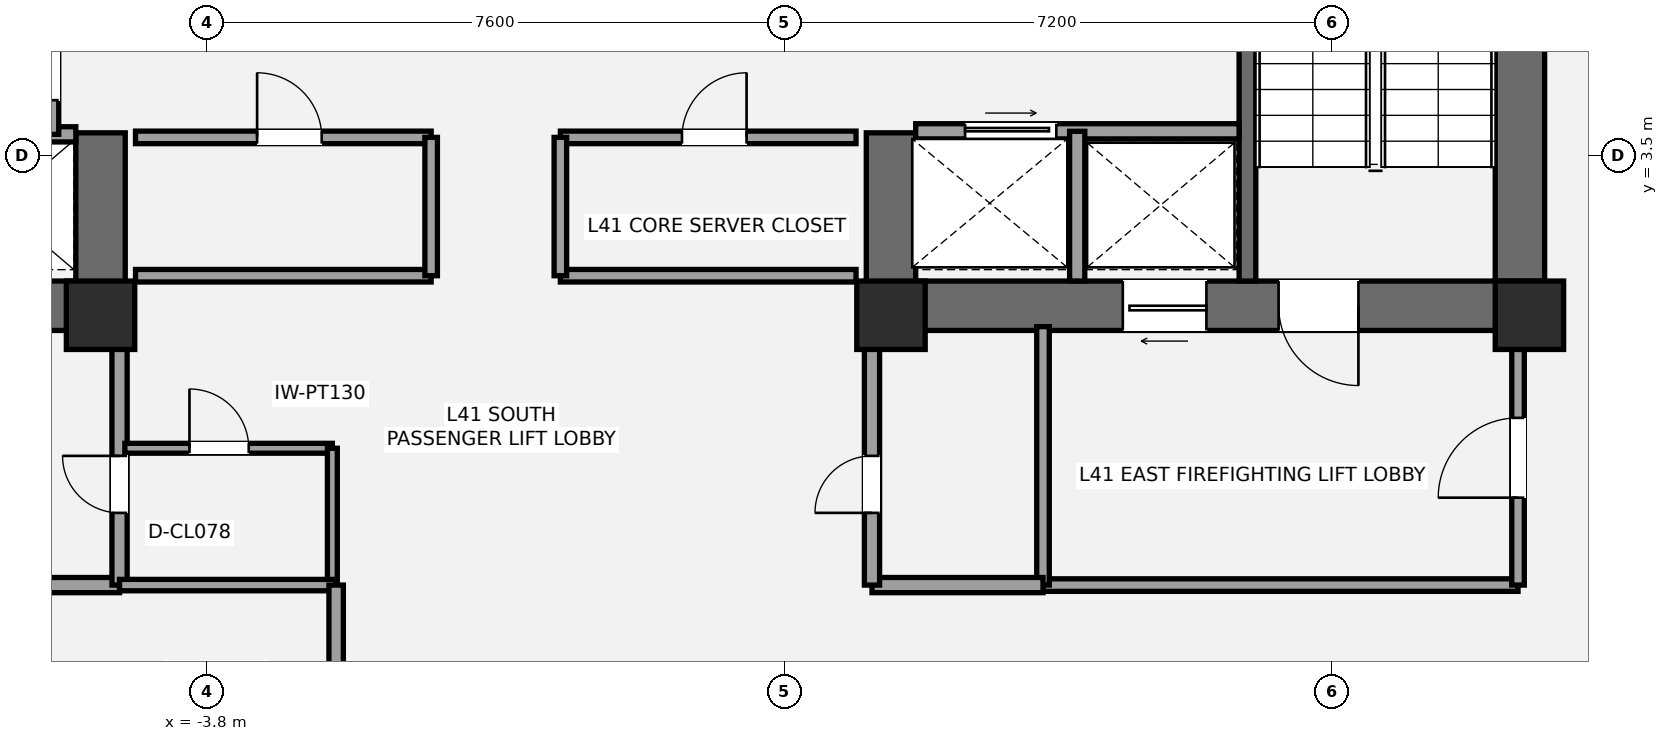
"""IFC4 building model, lengths in metres.
Left out: names, types, materials, properties, quantities, classifications, styles, units other than length and angle.
Written with IfcOpenShell. Run it as: python <this file> out.ifc"""

import sys

from ifc_helpers import new_model, si_unit, direction, frame, frame_2d, origin, origin_2d, place, context, subcontext, project, spatial, rectangle, extrude, element, fill, save


model = new_model("IFC4")
c1 = context("Model", 3, precision=1e-05, world=origin(), true_north=direction((0.0, 1.0)))
c2 = subcontext(c1, "Body", "Model", "MODEL_VIEW")
j1 = project(units=[si_unit("LENGTHUNIT", "METRE"), si_unit("PLANEANGLEUNIT", "RADIAN")], contexts=[c1])
p1 = place(None, origin())
s1 = spatial("IfcSite", under=j1, at=p1, CompositionType="ELEMENT")
p2 = place(p1, origin())
s2 = spatial("IfcBuilding", under=s1, at=p2, CompositionType="ELEMENT")
p3 = place(p2, frame((0.0, 0.0, 153.4)))
s3 = spatial("IfcBuildingStorey", under=s2, at=p3, CompositionType="ELEMENT", Elevation=153.4)
p4 = place(p3, frame((-4.875, 1.525, 0.0), z_axis=(0.0, 0.0, 1.0), x_axis=(-1.0, 0.0, 0.0)))
e1 = element("IfcWall", 1, at=p4, inside=s3, PredefinedType="SHEAR", context=c2, shape_type="SweptSolid", body=[
    extrude(rectangle(XDim=8.925, YDim=0.65, at=frame_2d((4.462, 0.0))), origin(), (0.0, 0.0, 1.0), 3.2),
])
p5 = place(p4, frame((5.425, 0.0, 0.0)))
e2 = element("IfcOpeningElement", 2, at=p5, cuts=e1, PredefinedType="OPENING", context=c2, shape_type="SweptSolid", body=[
    extrude(rectangle(XDim=1.05, YDim=2.15, at=frame_2d((0.525, 1.075))), frame((0.0, 0.335, 0.0), z_axis=(0.0, -1.0, 0.0), x_axis=(1.0, 0.0, 0.0)), (0.0, 0.0, 1.0), 0.67),
])
p6 = place(p4, frame((3.755, 0.0, 0.0)))
e3 = element("IfcOpeningElement", 3, at=p6, cuts=e1, PredefinedType="OPENING", context=c2, shape_type="SweptSolid", body=[
    extrude(rectangle(XDim=1.1, YDim=2.2, at=frame_2d((0.55, 1.1))), frame((0.0, 0.335, 0.0), z_axis=(0.0, -1.0, 0.0), x_axis=(1.0, 0.0, 0.0)), (0.0, 0.0, 1.0), 0.67),
])
p7 = place(p3, frame((-5.2, 1.2, 0.0), z_axis=(0.0, 0.0, 1.0), x_axis=(0.0, 1.0, 0.0)))
e4 = element("IfcWall", 4, at=p7, inside=s3, PredefinedType="SHEAR", context=c2, shape_type="SweptSolid", body=[
    extrude(rectangle(XDim=2.6, YDim=0.65, at=frame_2d((1.3, 0.0))), origin(), (0.0, 0.0, 1.0), 3.2),
])
p8 = place(p3, frame((13.475, 1.2, 0.0), z_axis=(0.0, 0.0, 1.0), x_axis=(0.0, 1.0, 0.0)))
e5 = element("IfcWall", 5, at=p8, inside=s3, PredefinedType="SHEAR", context=c2, shape_type="SweptSolid", body=[
    extrude(rectangle(XDim=8.45, YDim=0.65, at=frame_2d((4.225, 0.0))), origin(), (0.0, 0.0, 1.0), 3.2),
])
p9 = place(p3, frame((13.8, 1.525, 0.0), z_axis=(0.0, 0.0, 1.0), x_axis=(-1.0, 0.0, 0.0)))
e6 = element("IfcWall", 6, at=p9, inside=s3, PredefinedType="SHEAR", context=c2, shape_type="SweptSolid", body=[
    extrude(rectangle(XDim=8.925, YDim=0.65, at=frame_2d((4.462, 0.0))), origin(), (0.0, 0.0, 1.0), 3.2),
])
p10 = place(p9, frame((2.45, 0.0, 0.0)))
e7 = element("IfcOpeningElement", 7, at=p10, cuts=e6, PredefinedType="OPENING", context=c2, shape_type="SweptSolid", body=[
    extrude(rectangle(XDim=1.05, YDim=2.15, at=frame_2d((0.525, 1.075))), frame((0.0, 0.335, 0.0), z_axis=(0.0, -1.0, 0.0), x_axis=(1.0, 0.0, 0.0)), (0.0, 0.0, 1.0), 0.67),
])
p11 = place(p9, frame((4.45, 0.0, 0.0)))
e8 = element("IfcOpeningElement", 8, at=p11, cuts=e6, PredefinedType="OPENING", context=c2, shape_type="SweptSolid", body=[
    extrude(rectangle(XDim=1.1, YDim=2.2, at=frame_2d((0.55, 1.1))), frame((0.0, 0.335, 0.0), z_axis=(0.0, -1.0, 0.0), x_axis=(1.0, 0.0, 0.0)), (0.0, 0.0, 1.0), 0.67),
])
p12 = place(p3, frame((5.2, 1.2, 0.0), z_axis=(0.0, 0.0, 1.0), x_axis=(0.0, 1.0, 0.0)))
e9 = element("IfcWall", 9, at=p12, inside=s3, PredefinedType="SHEAR", context=c2, shape_type="SweptSolid", body=[
    extrude(rectangle(XDim=2.6, YDim=0.65, at=frame_2d((1.3, 0.0))), origin(), (0.0, 0.0, 1.0), 3.2),
])
p13 = place(p3, frame((9.89, 1.85, 0.0), z_axis=(0.0, 0.0, 1.0), x_axis=(0.0, 1.0, 0.0)))
e10 = element("IfcWall", 10, at=p13, inside=s3, PredefinedType="SHEAR", context=c2, shape_type="SweptSolid", body=[
    extrude(rectangle(XDim=7.15, YDim=0.22, at=frame_2d((3.575, 0.0))), origin(), (0.0, 0.0, 1.0), 3.2),
])
for number, where, z_axis, x_axis in (
    (11, (-5.2, 1.4, 0.0), (0.0, 0.0, 1.0), (1.0, 0.0, 0.0)),
    (12, (5.2, 1.4, 0.0), (0.0, 0.0, 1.0), (1.0, 0.0, 0.0)),
    (13, (13.6, 1.4, 0.0), (0.0, 0.0, 1.0), (1.0, 0.0, 0.0)),
):
    element("IfcColumn", number, at=place(p3, frame(where, z_axis=z_axis, x_axis=x_axis)), inside=s3, PredefinedType="COLUMN", context=c2, shape_type="SweptSolid", body=[
        extrude(rectangle(XDim=0.9, YDim=0.9, at=origin_2d()), origin(), (0.0, 0.0, 1.0), 3.2),
    ])
p14 = place(p3, frame((-7.2, -2.15, 0.0), z_axis=(0.0, 0.0, 1.0), x_axis=(1.0, 0.0, 0.0)))
e14 = element("IfcWall", 14, at=p14, inside=s3, PredefinedType="SOLIDWALL", context=c2, shape_type="SweptSolid", body=[
    extrude(rectangle(XDim=2.25, YDim=0.2, at=frame_2d((1.125, 0.0))), origin(), (0.0, 0.0, 1.0), 2.473),
])
p15 = place(p3, frame((-4.95, -2.15, 0.0), z_axis=(0.0, 0.0, 1.0), x_axis=(0.0, 1.0, 0.0)))
e15 = element("IfcWall", 15, at=p15, inside=s3, PredefinedType="SOLIDWALL", context=c2, shape_type="SweptSolid", body=[
    extrude(rectangle(XDim=3.4, YDim=0.2, at=frame_2d((1.7, 0.0))), origin(), (0.0, 0.0, 1.0), 2.473),
])
p16 = place(p15, frame((0.95, 0.0, 0.0)))
e16 = element("IfcOpeningElement", 16, at=p16, cuts=e15, PredefinedType="OPENING", context=c2, shape_type="SweptSolid", body=[
    extrude(rectangle(XDim=0.75, YDim=2.1, at=frame_2d((0.375, 1.05))), frame((0.0, 0.11, 0.0), z_axis=(0.0, -1.0, 0.0), x_axis=(1.0, 0.0, 0.0)), (0.0, 0.0, 1.0), 0.22),
])
p17 = place(p3, frame((7.2, -2.15, 0.0), z_axis=(0.0, 0.0, 1.0), x_axis=(1.0, 0.0, 0.0)))
e17 = element("IfcWall", 17, at=p17, inside=s3, PredefinedType="PARTITIONING", context=c2, shape_type="SweptSolid", body=[
    extrude(rectangle(XDim=6.25, YDim=0.165, at=frame_2d((3.125, 0.0))), origin(), (0.0, 0.0, 1.0), 3.02),
])
p18 = place(p3, frame((7.2, -2.15, 0.0), z_axis=(0.0, 0.0, 1.0), x_axis=(0.0, 1.0, 0.0)))
e18 = element("IfcWall", 18, at=p18, inside=s3, PredefinedType="PARTITIONING", context=c2, shape_type="SweptSolid", body=[
    extrude(rectangle(XDim=3.4, YDim=0.165, at=frame_2d((1.7, 0.0))), origin(), (0.0, 0.0, 1.0), 2.473),
])
p19 = place(p3, frame((13.45, -2.15, 0.0), z_axis=(0.0, 0.0, 1.0), x_axis=(0.0, 1.0, 0.0)))
e19 = element("IfcWall", 19, at=p19, inside=s3, PredefinedType="PARTITIONING", context=c2, shape_type="SweptSolid", body=[
    extrude(rectangle(XDim=3.4, YDim=0.165, at=frame_2d((1.7, 0.0))), origin(), (0.0, 0.0, 1.0), 2.473),
])
p20 = place(p19, frame((1.15, 0.0, 0.0)))
e20 = element("IfcOpeningElement", 20, at=p20, cuts=e19, PredefinedType="OPENING", context=c2, shape_type="SweptSolid", body=[
    extrude(rectangle(XDim=1.05, YDim=2.15, at=frame_2d((0.525, 1.075))), frame((0.0, 0.093, 0.0), z_axis=(0.0, -1.0, 0.0), x_axis=(1.0, 0.0, 0.0)), (0.0, 0.0, 1.0), 0.185),
])
p21 = place(p3, frame((4.95, -2.15, 0.0), z_axis=(0.0, 0.0, 1.0), x_axis=(1.0, 0.0, 0.0)))
e21 = element("IfcWall", 21, at=p21, inside=s3, PredefinedType="SOLIDWALL", context=c2, shape_type="SweptSolid", body=[
    extrude(rectangle(XDim=2.25, YDim=0.2, at=frame_2d((1.125, 0.0))), origin(), (0.0, 0.0, 1.0), 3.02),
])
p22 = place(p3, frame((4.95, -2.15, 0.0), z_axis=(0.0, 0.0, 1.0), x_axis=(0.0, 1.0, 0.0)))
e22 = element("IfcWall", 22, at=p22, inside=s3, PredefinedType="SOLIDWALL", context=c2, shape_type="SweptSolid", body=[
    extrude(rectangle(XDim=3.4, YDim=0.2, at=frame_2d((1.7, 0.0))), origin(), (0.0, 0.0, 1.0), 2.473),
])
p23 = place(p22, frame((0.95, 0.0, 0.0)))
e23 = element("IfcOpeningElement", 23, at=p23, cuts=e22, PredefinedType="OPENING", context=c2, shape_type="SweptSolid", body=[
    extrude(rectangle(XDim=0.75, YDim=2.1, at=frame_2d((0.375, 1.05))), frame((0.0, 0.11, 0.0), z_axis=(0.0, -1.0, 0.0), x_axis=(1.0, 0.0, 0.0)), (0.0, 0.0, 1.0), 0.22),
])
p24 = place(p3, frame((-4.88, -0.35, 0.0), z_axis=(0.0, 0.0, 1.0), x_axis=(1.0, 0.0, 0.0)))
e24 = element("IfcWall", 24, at=p24, inside=s3, PredefinedType="PARTITIONING", context=c2, shape_type="SweptSolid", body=[
    extrude(rectangle(XDim=2.73, YDim=0.13, at=frame_2d((1.365, 0.0))), origin(), (0.0, 0.0, 1.0), 3.02),
])
p25 = place(p24, frame((0.85, 0.0, 0.0)))
e25 = element("IfcOpeningElement", 25, at=p25, cuts=e24, PredefinedType="OPENING", context=c2, shape_type="SweptSolid", body=[
    extrude(rectangle(XDim=0.78, YDim=2.1, at=frame_2d((0.39, 1.05))), frame((0.0, 0.075, 0.0), z_axis=(0.0, -1.0, 0.0), x_axis=(1.0, 0.0, 0.0)), (0.0, 0.0, 1.0), 0.15),
])
p26 = place(p3, frame((-2.15, -2.15, 0.0), z_axis=(0.0, 0.0, 1.0), x_axis=(0.0, 1.0, 0.0)))
e26 = element("IfcWall", 26, at=p26, inside=s3, PredefinedType="PARTITIONING", context=c2, shape_type="SweptSolid", body=[
    extrude(rectangle(XDim=1.8, YDim=0.13, at=frame_2d((0.9, 0.0))), origin(), (0.0, 0.0, 1.0), 3.02),
])
p27 = place(p3, frame((-9.78, 3.78, 0.0), z_axis=(0.0, 0.0, 1.0), x_axis=(1.0, 0.0, 0.0)))
e27 = element("IfcWall", 27, at=p27, inside=s3, PredefinedType="SOLIDWALL", context=c2, shape_type="SweptSolid", body=[
    extrude(rectangle(XDim=4.255, YDim=0.2, at=frame_2d((2.127, 0.0))), origin(), (0.0, 0.0, 1.0), 3.02),
])
p28 = place(p3, frame((-5.85, 3.78, 0.0), z_axis=(0.0, 0.0, 1.0), x_axis=(0.0, 1.0, 0.0)))
e28 = element("IfcWall", 28, at=p28, inside=s3, PredefinedType="SOLIDWALL", context=c2, shape_type="SweptSolid", body=[
    extrude(rectangle(XDim=1.69, YDim=0.2, at=frame_2d((0.845, 0.0))), origin(), (0.0, 0.0, 1.0), 3.02),
])
p29 = place(p28, frame((0.45, 0.0, 0.0)))
e29 = element("IfcOpeningElement", 29, at=p29, cuts=e28, PredefinedType="OPENING", context=c2, shape_type="SweptSolid", body=[
    extrude(rectangle(XDim=0.75, YDim=2.1, at=frame_2d((0.375, 1.05))), frame((0.0, 0.11, 0.0), z_axis=(0.0, -1.0, 0.0), x_axis=(1.0, 0.0, 0.0)), (0.0, 0.0, 1.0), 0.22),
])
p30 = place(p3, frame((5.525, 3.82, 0.0), z_axis=(0.0, 0.0, 1.0), x_axis=(1.0, 0.0, 0.0)))
e30 = element("IfcWall", 30, at=p30, inside=s3, PredefinedType="SOLIDWALL", context=c2, shape_type="SweptSolid", body=[
    extrude(rectangle(XDim=4.255, YDim=0.2, at=frame_2d((2.127, 0.0))), origin(), (0.0, 0.0, 1.0), 3.02),
])
p31 = place(p30, frame((0.65, 0.0, 0.0)))
e31 = element("IfcOpeningElement", 31, at=p31, cuts=e30, PredefinedType="OPENING", context=c2, shape_type="SweptSolid", body=[
    extrude(rectangle(XDim=1.2, YDim=2.2, at=frame_2d((0.6, 1.1))), frame((0.0, 0.11, 0.0), z_axis=(0.0, -1.0, 0.0), x_axis=(1.0, 0.0, 0.0)), (0.0, 0.0, 1.0), 0.22),
])
p32 = place(p3, frame((7.65, 1.85, 0.0), z_axis=(0.0, 0.0, 1.0), x_axis=(0.0, 1.0, 0.0)))
e32 = element("IfcWall", 32, at=p32, inside=s3, PredefinedType="SOLIDWALL", context=c2, shape_type="SweptSolid", body=[
    extrude(rectangle(XDim=1.97, YDim=0.2, at=frame_2d((0.985, 0.0))), origin(), (0.0, 0.0, 1.0), 3.02),
])
p33 = place(p3, frame((-4.74, 1.92, 0.0), z_axis=(0.0, 0.0, 1.0), x_axis=(1.0, 0.0, 0.0)))
e33 = element("IfcWall", 33, at=p33, inside=s3, PredefinedType="PARTITIONING", context=c2, shape_type="SweptSolid", body=[
    extrude(rectangle(XDim=3.89, YDim=0.165, at=frame_2d((1.945, 0.0))), origin(), (0.0, 0.0, 1.0), 2.16),
])
p34 = place(p3, frame((-4.74, 3.74, 0.0), z_axis=(0.0, 0.0, 1.0), x_axis=(1.0, 0.0, 0.0)))
e34 = element("IfcWall", 34, at=p34, inside=s3, PredefinedType="PARTITIONING", context=c2, shape_type="SweptSolid", body=[
    extrude(rectangle(XDim=3.89, YDim=0.165, at=frame_2d((1.945, 0.0))), origin(), (0.0, 0.0, 1.0), 3.02),
])
p35 = place(p34, frame((1.6, 0.0, 0.0)))
e35 = element("IfcOpeningElement", 35, at=p35, cuts=e34, PredefinedType="OPENING", context=c2, shape_type="SweptSolid", body=[
    extrude(rectangle(XDim=0.85, YDim=2.1, at=frame_2d((0.425, 1.05))), frame((0.0, 0.093, 0.0), z_axis=(0.0, -1.0, 0.0), x_axis=(1.0, 0.0, 0.0)), (0.0, 0.0, 1.0), 0.185),
])
p36 = place(p3, frame((-0.85, 1.92, 0.0), z_axis=(0.0, 0.0, 1.0), x_axis=(0.0, 1.0, 0.0)))
e36 = element("IfcWall", 36, at=p36, inside=s3, PredefinedType="PARTITIONING", context=c2, shape_type="SweptSolid", body=[
    extrude(rectangle(XDim=1.82, YDim=0.165, at=frame_2d((0.91, 0.0))), origin(), (0.0, 0.0, 1.0), 3.02),
])
p37 = place(p3, frame((0.85, 1.92, 0.0), z_axis=(0.0, 0.0, 1.0), x_axis=(1.0, 0.0, 0.0)))
e37 = element("IfcWall", 37, at=p37, inside=s3, PredefinedType="PARTITIONING", context=c2, shape_type="SweptSolid", body=[
    extrude(rectangle(XDim=3.89, YDim=0.165, at=frame_2d((1.945, 0.0))), origin(), (0.0, 0.0, 1.0), 2.16),
])
p38 = place(p3, frame((0.85, 3.74, 0.0), z_axis=(0.0, 0.0, 1.0), x_axis=(1.0, 0.0, 0.0)))
e38 = element("IfcWall", 38, at=p38, inside=s3, PredefinedType="PARTITIONING", context=c2, shape_type="SweptSolid", body=[
    extrude(rectangle(XDim=3.89, YDim=0.165, at=frame_2d((1.945, 0.0))), origin(), (0.0, 0.0, 1.0), 3.02),
])
p39 = place(p38, frame((1.6, 0.0, 0.0)))
e39 = element("IfcOpeningElement", 39, at=p39, cuts=e38, PredefinedType="OPENING", context=c2, shape_type="SweptSolid", body=[
    extrude(rectangle(XDim=0.85, YDim=2.1, at=frame_2d((0.425, 1.05))), frame((0.0, 0.093, 0.0), z_axis=(0.0, -1.0, 0.0), x_axis=(1.0, 0.0, 0.0)), (0.0, 0.0, 1.0), 0.185),
])
p40 = place(p3, frame((0.85, 1.92, 0.0), z_axis=(0.0, 0.0, 1.0), x_axis=(0.0, 1.0, 0.0)))
e40 = element("IfcWall", 40, at=p40, inside=s3, PredefinedType="PARTITIONING", context=c2, shape_type="SweptSolid", body=[
    extrude(rectangle(XDim=1.82, YDim=0.165, at=frame_2d((0.91, 0.0))), origin(), (0.0, 0.0, 1.0), 3.02),
])
p41 = place(p3, frame((-4.95, -2.15, 0.0), z_axis=(0.0, 0.0, 1.0), x_axis=(1.0, 0.0, 0.0)))
e41 = element("IfcWall", 41, at=p41, inside=s3, PredefinedType="PLUMBINGWALL", context=c2, shape_type="SweptSolid", body=[
    extrude(rectangle(XDim=2.85, YDim=0.15, at=frame_2d((1.425, 0.0))), origin(), (0.0, 0.0, 1.0), 2.473),
])
p42 = place(p3, frame((-2.1, -4.05, 0.0), z_axis=(0.0, 0.0, 1.0), x_axis=(0.0, 1.0, 0.0)))
e42 = element("IfcWall", 42, at=p42, inside=s3, PredefinedType="PLUMBINGWALL", context=c2, shape_type="SweptSolid", body=[
    extrude(rectangle(XDim=1.9, YDim=0.19, at=frame_2d((0.95, 0.0))), origin(), (0.0, 0.0, 1.0), 3.02),
])
p43 = place(p10, origin())
e43 = element("IfcDoor", 43, at=p43, inside=s3, OperationType="SINGLE_SWING_LEFT", PredefinedType="DOOR", context=c2, shape_type="SweptSolid", body=[
    extrude(rectangle(XDim=1.05, YDim=2.15, at=frame_2d((0.525, 1.075))), frame((0.0, 0.025, 0.0), z_axis=(0.0, -1.0, 0.0), x_axis=(1.0, 0.0, 0.0)), (0.0, 0.0, 1.0), 0.05),
])
fill(e7, e43)
p44 = place(p16, origin())
e44 = element("IfcDoor", 44, at=p44, inside=s3, OperationType="SINGLE_SWING_RIGHT", PredefinedType="DOOR", context=c2, shape_type="SweptSolid", body=[
    extrude(rectangle(XDim=0.75, YDim=2.1, at=frame_2d((0.375, 1.05))), frame((0.0, 0.025, 0.0), z_axis=(0.0, -1.0, 0.0), x_axis=(1.0, 0.0, 0.0)), (0.0, 0.0, 1.0), 0.05),
])
fill(e16, e44)
p45 = place(p20, origin())
e45 = element("IfcDoor", 45, at=p45, inside=s3, OperationType="SINGLE_SWING_LEFT", PredefinedType="DOOR", context=c2, shape_type="SweptSolid", body=[
    extrude(rectangle(XDim=1.05, YDim=2.15, at=frame_2d((0.525, 1.075))), frame((0.0, 0.025, 0.0), z_axis=(0.0, -1.0, 0.0), x_axis=(1.0, 0.0, 0.0)), (0.0, 0.0, 1.0), 0.05),
])
fill(e20, e45)
p46 = place(p23, origin())
e46 = element("IfcDoor", 46, at=p46, inside=s3, OperationType="SINGLE_SWING_LEFT", PredefinedType="DOOR", context=c2, shape_type="SweptSolid", body=[
    extrude(rectangle(XDim=0.75, YDim=2.1, at=frame_2d((0.375, 1.05))), frame((0.0, 0.025, 0.0), z_axis=(0.0, -1.0, 0.0), x_axis=(1.0, 0.0, 0.0)), (0.0, 0.0, 1.0), 0.05),
])
fill(e23, e46)
p47 = place(p25, origin())
e47 = element("IfcDoor", 47, at=p47, inside=s3, OperationType="SINGLE_SWING_LEFT", PredefinedType="DOOR", context=c2, shape_type="SweptSolid", body=[
    extrude(rectangle(XDim=0.78, YDim=2.1, at=frame_2d((0.39, 1.05))), frame((0.0, 0.025, 0.0), z_axis=(0.0, -1.0, 0.0), x_axis=(1.0, 0.0, 0.0)), (0.0, 0.0, 1.0), 0.05),
])
fill(e25, e47)
p48 = place(p29, origin())
e48 = element("IfcDoor", 48, at=p48, inside=s3, OperationType="SINGLE_SWING_RIGHT", PredefinedType="DOOR", context=c2, shape_type="SweptSolid", body=[
    extrude(rectangle(XDim=0.75, YDim=2.1, at=frame_2d((0.375, 1.05))), frame((0.0, 0.025, 0.0), z_axis=(0.0, -1.0, 0.0), x_axis=(1.0, 0.0, 0.0)), (0.0, 0.0, 1.0), 0.05),
])
fill(e29, e48)
p49 = place(p11, origin())
e49 = element("IfcDoor", 49, at=p49, inside=s3, OperationType="SLIDING_TO_LEFT", PredefinedType="DOOR", context=c2, shape_type="SweptSolid", body=[
    extrude(rectangle(XDim=1.1, YDim=2.2, at=frame_2d((0.55, 1.1))), frame((0.0, 0.025, 0.0), z_axis=(0.0, -1.0, 0.0), x_axis=(1.0, 0.0, 0.0)), (0.0, 0.0, 1.0), 0.05),
])
fill(e8, e49)
p50 = place(p31, origin())
e50 = element("IfcDoor", 50, at=p50, inside=s3, OperationType="SLIDING_TO_RIGHT", PredefinedType="DOOR", context=c2, shape_type="SweptSolid", body=[
    extrude(rectangle(XDim=1.2, YDim=2.2, at=frame_2d((0.6, 1.1))), frame((0.0, 0.025, 0.0), z_axis=(0.0, -1.0, 0.0), x_axis=(1.0, 0.0, 0.0)), (0.0, 0.0, 1.0), 0.05),
])
fill(e31, e50)
p51 = place(p35, origin())
e51 = element("IfcDoor", 51, at=p51, inside=s3, OperationType="SINGLE_SWING_LEFT", PredefinedType="DOOR", context=c2, shape_type="SweptSolid", body=[
    extrude(rectangle(XDim=0.85, YDim=2.1, at=frame_2d((0.425, 1.05))), frame((0.0, 0.025, 0.0), z_axis=(0.0, -1.0, 0.0), x_axis=(1.0, 0.0, 0.0)), (0.0, 0.0, 1.0), 0.05),
])
fill(e35, e51)
p52 = place(p39, origin())
e52 = element("IfcDoor", 52, at=p52, inside=s3, OperationType="SINGLE_SWING_RIGHT", PredefinedType="DOOR", context=c2, shape_type="SweptSolid", body=[
    extrude(rectangle(XDim=0.85, YDim=2.1, at=frame_2d((0.425, 1.05))), frame((0.0, 0.025, 0.0), z_axis=(0.0, -1.0, 0.0), x_axis=(1.0, 0.0, 0.0)), (0.0, 0.0, 1.0), 0.05),
])
fill(e39, e52)
save(model, sys.argv[1])
